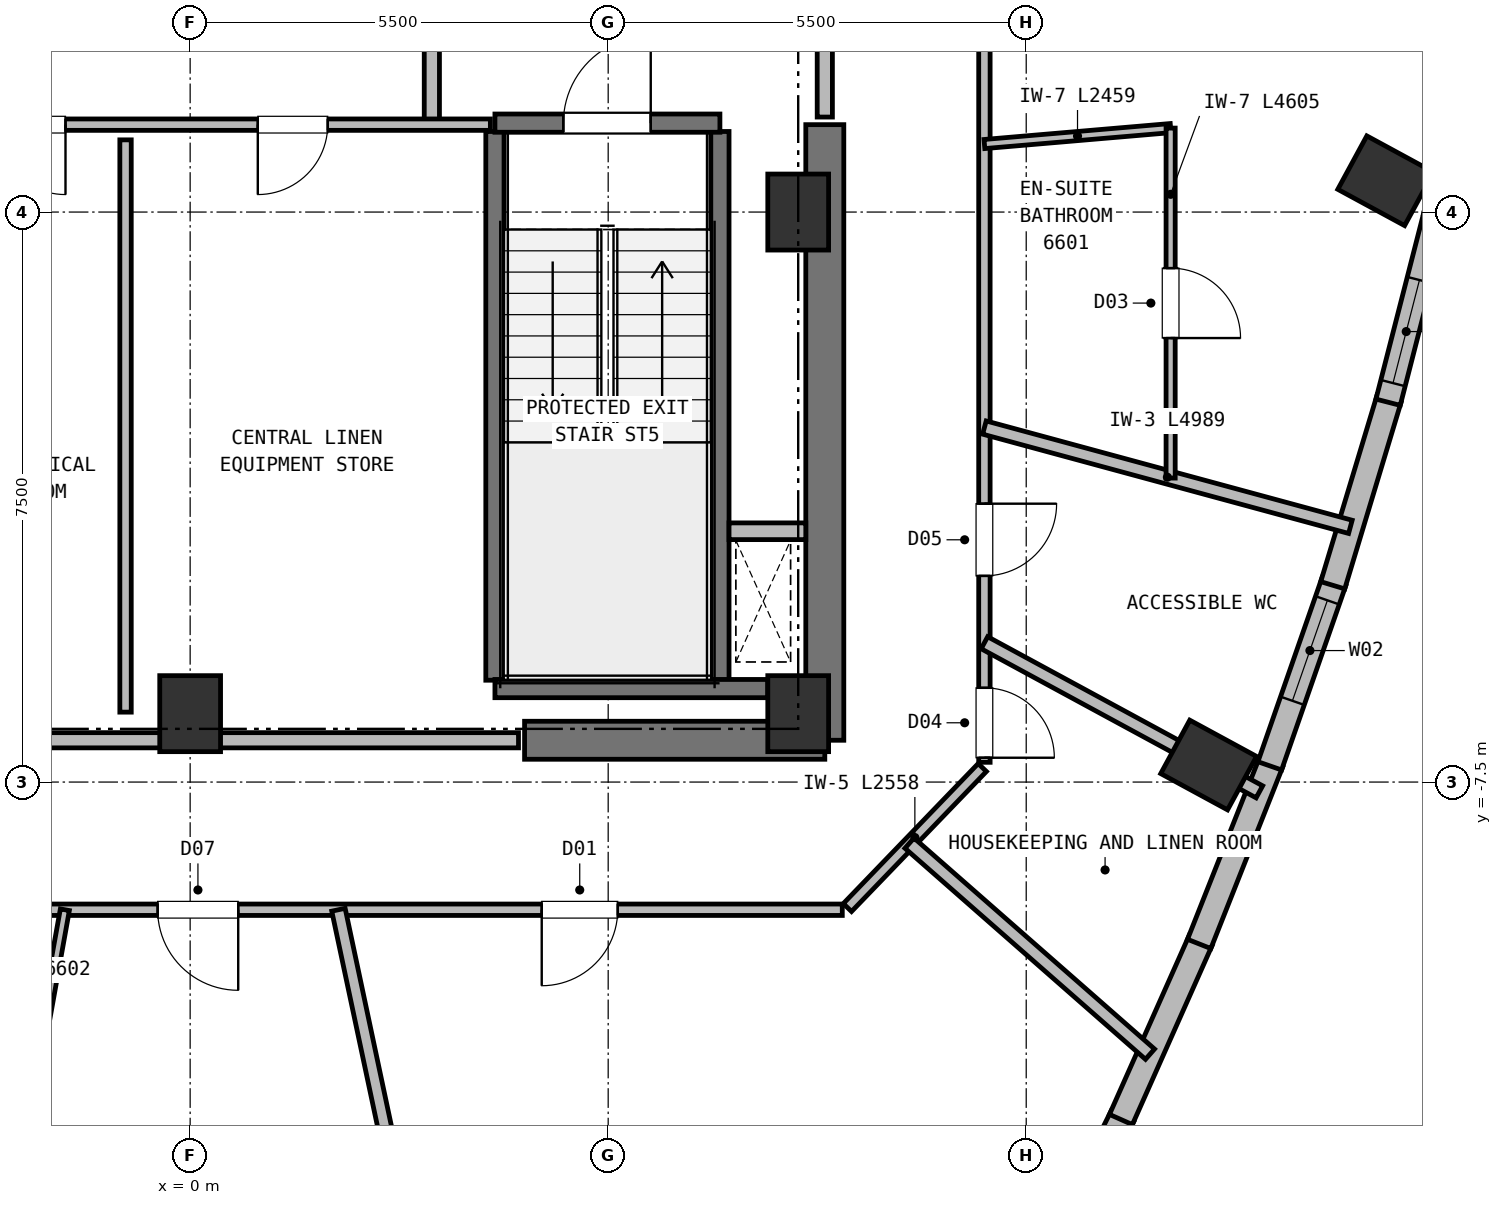
"""IFC4 building model, lengths in metres.
Left out: names, types, materials, properties, quantities, classifications, styles, units other than length and angle.
Written with IfcOpenShell. Run it as: python <this file> out.ifc"""

import sys

from ifc_helpers import new_model, si_unit, direction, frame, frame_2d, origin, origin_2d, place, context, subcontext, project, spatial, rectangle, extrude, element, fill, save


model = new_model("IFC4")
c1 = context("Model", 3, precision=1e-05, world=origin(), true_north=direction((0.0, 1.0)))
c2 = subcontext(c1, "Body", "Model", "MODEL_VIEW")
j1 = project(units=[si_unit("LENGTHUNIT", "METRE"), si_unit("PLANEANGLEUNIT", "RADIAN")], contexts=[c1])
p1 = place(None, origin())
s1 = spatial("IfcSite", under=j1, at=p1, CompositionType="ELEMENT")
p2 = place(p1, origin())
s2 = spatial("IfcBuilding", under=s1, at=p2, CompositionType="ELEMENT")
p3 = place(p2, frame((0.0, 0.0, 251.15)))
s3 = spatial("IfcBuildingStorey", under=s2, at=p3, CompositionType="ELEMENT", Elevation=251.15)
for number, where, z_axis, x_axis in (
    (1, (0.0, -6.6, 0.0), (0.0, 0.0, 1.0), (1.0, 0.0, 0.0)),
    (2, (8.0, -6.6, 0.0), (0.0, 0.0, 1.0), (1.0, 0.0, 0.0)),
    (3, (8.0, 0.0, 0.0), (0.0, 0.0, 1.0), (1.0, 0.0, 0.0)),
):
    element("IfcColumn", number, at=place(p3, frame(where, z_axis=z_axis, x_axis=x_axis)), inside=s3, PredefinedType="COLUMN", context=c2, shape_type="SweptSolid", body=[
        extrude(rectangle(XDim=0.8, YDim=1.0, at=origin_2d()), origin(), (0.0, 0.0, 1.0), 3.8),
    ])
p4 = place(p3, frame((4.4, -6.95, 0.0), z_axis=(0.0, 0.0, 1.0), x_axis=(1.0, 0.0, 0.0)))
e4 = element("IfcWall", 4, at=p4, inside=s3, PredefinedType="SHEAR", context=c2, shape_type="SweptSolid", body=[
    extrude(rectangle(XDim=3.95, YDim=0.5, at=frame_2d((1.975, 0.0))), origin(), (0.0, 0.0, 1.0), 3.49),
])
p5 = place(p3, frame((8.35, -6.95, 0.0), z_axis=(0.0, 0.0, 1.0), x_axis=(0.0, 1.0, 0.0)))
e5 = element("IfcWall", 5, at=p5, inside=s3, PredefinedType="SHEAR", context=c2, shape_type="SweptSolid", body=[
    extrude(rectangle(XDim=8.1, YDim=0.5, at=frame_2d((4.05, 0.0))), origin(), (0.0, 0.0, 1.0), 3.49),
])
for number, where, z_axis, x_axis in (
    (6, (13.4, -7.276, 0.0), (0.0, 0.0, 1.0), (0.477, 0.879, 0.0)),
    (7, (15.73, 0.412, 0.0), (0.0, 0.0, 1.0), (0.477, 0.879, 0.0)),
):
    element("IfcColumn", number, at=place(p3, frame(where, z_axis=z_axis, x_axis=x_axis)), inside=s3, PredefinedType="COLUMN", context=c2, shape_type="SweptSolid", body=[
        extrude(rectangle(XDim=0.8, YDim=1.0, at=origin_2d()), origin(), (0.0, 0.0, 1.0), 3.8),
    ])
p6 = place(p3, frame((12.267, -11.895, 0.0), z_axis=(0.0, 0.0, 1.0), x_axis=(-0.44393335953, -0.896059803973, 0.0)))
e8 = element("IfcWall", 8, at=p6, inside=s3, PredefinedType="SOLIDWALL", context=c2, shape_type="SweptSolid", body=[
    extrude(rectangle(XDim=2.593, YDim=0.33, at=frame_2d((1.296, 0.0))), origin(), (0.0, 0.0, 1.0), 3.49),
])
p7 = place(p6, frame((0.596, 0.0, 0.72)))
e9 = element("IfcOpeningElement", 9, at=p7, cuts=e8, PredefinedType="OPENING", context=c2, shape_type="SweptSolid", body=[
    extrude(rectangle(XDim=1.4, YDim=1.84, at=frame_2d((0.7, 0.92))), frame((0.0, 0.175, 0.0), z_axis=(0.0, -1.0, 0.0), x_axis=(1.0, 0.0, 0.0)), (0.0, 0.0, 1.0), 0.35),
])
p8 = place(p3, frame((13.295, -9.584, 0.0), z_axis=(0.0, 0.0, 1.0), x_axis=(-0.406630213632, -0.913592835656, 0.0)))
e10 = element("IfcWall", 10, at=p8, inside=s3, PredefinedType="SOLIDWALL", context=c2, shape_type="SweptSolid", body=[
    extrude(rectangle(XDim=2.579, YDim=0.33, at=frame_2d((1.29, 0.0))), origin(), (0.0, 0.0, 1.0), 3.49),
])
p9 = place(p3, frame((14.222, -7.24, 0.0), z_axis=(0.0, 0.0, 1.0), x_axis=(-0.368145960329, -0.929768009717, 0.0)))
e11 = element("IfcWall", 11, at=p9, inside=s3, PredefinedType="SOLIDWALL", context=c2, shape_type="SweptSolid", body=[
    extrude(rectangle(XDim=2.57, YDim=0.33, at=frame_2d((1.285, 0.0))), origin(), (0.0, 0.0, 1.0), 3.49),
])
p10 = place(p3, frame((15.048, -4.863, 0.0), z_axis=(0.0, 0.0, 1.0), x_axis=(-0.328900678989, -0.944364518266, 0.0)))
e12 = element("IfcWall", 12, at=p10, inside=s3, PredefinedType="SOLIDWALL", context=c2, shape_type="SweptSolid", body=[
    extrude(rectangle(XDim=2.566, YDim=0.33, at=frame_2d((1.283, 0.0))), origin(), (0.0, 0.0, 1.0), 3.49),
])
p11 = place(p10, frame((0.26, 0.0, 0.72)))
e13 = element("IfcOpeningElement", 13, at=p11, cuts=e12, PredefinedType="OPENING", context=c2, shape_type="SweptSolid", body=[
    extrude(rectangle(XDim=1.4, YDim=1.84, at=frame_2d((0.7, 0.92))), frame((0.0, 0.175, 0.0), z_axis=(0.0, -1.0, 0.0), x_axis=(1.0, 0.0, 0.0)), (0.0, 0.0, 1.0), 0.35),
])
p12 = place(p3, frame((15.774, -2.454, 0.0), z_axis=(0.0, 0.0, 1.0), x_axis=(-0.288953589152, -0.957343106371, 0.0)))
e14 = element("IfcWall", 14, at=p12, inside=s3, PredefinedType="SOLIDWALL", context=c2, shape_type="SweptSolid", body=[
    extrude(rectangle(XDim=2.566, YDim=0.33, at=frame_2d((1.283, 0.0))), origin(), (0.0, 0.0, 1.0), 3.49),
])
p13 = place(p3, frame((16.4, -0.012, 0.0), z_axis=(0.0, 0.0, 1.0), x_axis=(-0.248743226802, -0.968569464272, 0.0)))
e15 = element("IfcWall", 15, at=p13, inside=s3, PredefinedType="SOLIDWALL", context=c2, shape_type="SweptSolid", body=[
    extrude(rectangle(XDim=2.571, YDim=0.33, at=frame_2d((1.285, 0.0))), origin(), (0.0, 0.0, 1.0), 3.49),
])
p14 = place(p13, frame((0.911, 0.0, 0.72)))
e16 = element("IfcOpeningElement", 16, at=p14, cuts=e15, PredefinedType="OPENING", context=c2, shape_type="SweptSolid", body=[
    extrude(rectangle(XDim=1.4, YDim=1.84, at=frame_2d((0.7, 0.92))), frame((0.0, 0.175, 0.0), z_axis=(0.0, -1.0, 0.0), x_axis=(1.0, 0.0, 0.0)), (0.0, 0.0, 1.0), 0.35),
])
for number, where, z_axis, x_axis in (
    (17, (4.01, -6.16, 0.0), (0.0, 0.0, 1.0), (0.0, 1.0, 0.0)),
    (18, (6.97, -6.16, 0.0), (0.0, 0.0, 1.0), (0.0, 1.0, 0.0)),
):
    element("IfcWall", number, at=place(p3, frame(where, z_axis=z_axis, x_axis=x_axis)), inside=s3, PredefinedType="SHEAR", context=c2, shape_type="SweptSolid", body=[
        extrude(rectangle(XDim=7.22, YDim=0.24, at=frame_2d((3.61, 0.0))), origin(), (0.0, 0.0, 1.0), 3.49),
    ])
p15 = place(p3, frame((4.01, -6.27, 0.0), z_axis=(0.0, 0.0, 1.0), x_axis=(1.0, 0.0, 0.0)))
e19 = element("IfcWall", 19, at=p15, inside=s3, PredefinedType="SHEAR", context=c2, shape_type="SweptSolid", body=[
    extrude(rectangle(XDim=3.59, YDim=0.24, at=frame_2d((1.795, 0.0))), origin(), (0.0, 0.0, 1.0), 3.49),
])
p16 = place(p3, frame((4.01, 1.17, 0.0), z_axis=(0.0, 0.0, 1.0), x_axis=(1.0, 0.0, 0.0)))
e20 = element("IfcWall", 20, at=p16, inside=s3, PredefinedType="SHEAR", context=c2, shape_type="SweptSolid", body=[
    extrude(rectangle(XDim=2.96, YDim=0.24, at=frame_2d((1.48, 0.0))), origin(), (0.0, 0.0, 1.0), 3.49),
])
p17 = place(p16, frame((0.9, 0.0, 0.0)))
e21 = element("IfcOpeningElement", 21, at=p17, cuts=e20, PredefinedType="OPENING", context=c2, shape_type="SweptSolid", body=[
    extrude(rectangle(XDim=1.15, YDim=2.15, at=frame_2d((0.575, 1.075))), frame((0.0, 0.13, 0.0), z_axis=(0.0, -1.0, 0.0), x_axis=(1.0, 0.0, 0.0)), (0.0, 0.0, 1.0), 0.26),
])
p18 = place(p3, frame((7.09, -4.2, 0.0), z_axis=(0.0, 0.0, 1.0), x_axis=(1.0, 0.0, 0.0)))
e22 = element("IfcWall", 22, at=p18, inside=s3, PredefinedType="PARTITIONING", context=c2, shape_type="SweptSolid", body=[
    extrude(rectangle(XDim=1.01, YDim=0.22, at=frame_2d((0.505, 0.0))), origin(), (0.0, 0.0, 1.0), 3.49),
])
p19 = place(p3, frame((3.18, 1.15, 0.0), z_axis=(0.0, 0.0, 1.0), x_axis=(0.0, 1.0, 0.0)))
e23 = element("IfcWall", 23, at=p19, inside=s3, PredefinedType="PARTITIONING", context=c2, shape_type="SweptSolid", body=[
    extrude(rectangle(XDim=3.3, YDim=0.2, at=frame_2d((1.65, 0.0))), origin(), (0.0, 0.0, 1.0), 3.49),
])
p20 = place(p19, frame((1.08, 0.0, 0.0)))
e24 = element("IfcOpeningElement", 24, at=p20, cuts=e23, PredefinedType="OPENING", context=c2, shape_type="SweptSolid", body=[
    extrude(rectangle(XDim=1.15, YDim=2.15, at=frame_2d((0.575, 1.075))), frame((0.0, 0.11, 0.0), z_axis=(0.0, -1.0, 0.0), x_axis=(1.0, 0.0, 0.0)), (0.0, 0.0, 1.0), 0.22),
])
p21 = place(p3, frame((8.35, 1.25, 0.0), z_axis=(0.0, 0.0, 1.0), x_axis=(0.0, 1.0, 0.0)))
e25 = element("IfcWall", 25, at=p21, inside=s3, PredefinedType="PARTITIONING", context=c2, shape_type="SweptSolid", body=[
    extrude(rectangle(XDim=5.3, YDim=0.2, at=frame_2d((2.65, 0.0))), origin(), (0.0, 0.0, 1.0), 3.49),
])
p22 = place(p21, frame((0.95, 0.0, 0.0)))
e26 = element("IfcOpeningElement", 26, at=p22, cuts=e25, PredefinedType="OPENING", context=c2, shape_type="SweptSolid", body=[
    extrude(rectangle(XDim=1.15, YDim=2.15, at=frame_2d((0.575, 1.075))), frame((0.0, 0.11, 0.0), z_axis=(0.0, -1.0, 0.0), x_axis=(1.0, 0.0, 0.0)), (0.0, 0.0, 1.0), 0.22),
])
p23 = place(p3, frame((3.95, 1.15, 0.0), z_axis=(0.0, 0.0, 1.0), x_axis=(-1.0, 0.0, 0.0)))
e27 = element("IfcWall", 27, at=p23, inside=s3, PredefinedType="PARTITIONING", context=c2, shape_type="SweptSolid", body=[
    extrude(rectangle(XDim=7.9, YDim=0.15, at=frame_2d((3.95, 0.0))), origin(), (0.0, 0.0, 1.0), 3.49),
])
p24 = place(p23, frame((5.59, 0.0, 0.0)))
e28 = element("IfcOpeningElement", 28, at=p24, cuts=e27, PredefinedType="OPENING", context=c2, shape_type="SweptSolid", body=[
    extrude(rectangle(XDim=0.92, YDim=2.05, at=frame_2d((0.46, 1.025))), frame((0.0, 0.085, 0.0), z_axis=(0.0, -1.0, 0.0), x_axis=(1.0, 0.0, 0.0)), (0.0, 0.0, 1.0), 0.17),
])
p25 = place(p23, frame((2.14, 0.0, 0.0)))
e29 = element("IfcOpeningElement", 29, at=p25, cuts=e27, PredefinedType="OPENING", context=c2, shape_type="SweptSolid", body=[
    extrude(rectangle(XDim=0.92, YDim=2.05, at=frame_2d((0.46, 1.025))), frame((0.0, 0.085, 0.0), z_axis=(0.0, -1.0, 0.0), x_axis=(1.0, 0.0, 0.0)), (0.0, 0.0, 1.0), 0.17),
])
p26 = place(p3, frame((-4.32, -6.95, 0.0), z_axis=(0.0, 0.0, 1.0), x_axis=(1.0, 0.0, 0.0)))
e30 = element("IfcWall", 30, at=p26, inside=s3, PredefinedType="PARTITIONING", context=c2, shape_type="SweptSolid", body=[
    extrude(rectangle(XDim=8.64, YDim=0.2, at=frame_2d((4.32, 0.0))), origin(), (0.0, 0.0, 1.0), 3.49),
])
p27 = place(p3, frame((-0.85, -6.58, 0.0), z_axis=(0.0, 0.0, 1.0), x_axis=(0.0, 1.0, 0.0)))
e31 = element("IfcWall", 31, at=p27, inside=s3, PredefinedType="PARTITIONING", context=c2, shape_type="SweptSolid", body=[
    extrude(rectangle(XDim=7.53, YDim=0.15, at=frame_2d((3.765, 0.0))), origin(), (0.0, 0.0, 1.0), 3.49),
])
p28 = place(p3, frame((8.58, -9.18, 0.0), z_axis=(0.0, 0.0, 1.0), x_axis=(-1.0, 0.0, 0.0)))
e32 = element("IfcWall", 32, at=p28, inside=s3, PredefinedType="PARTITIONING", context=c2, shape_type="SweptSolid", body=[
    extrude(rectangle(XDim=17.16, YDim=0.15, at=frame_2d((8.58, 0.0))), origin(), (0.0, 0.0, 1.0), 3.17),
])
p29 = place(p28, frame((14.872, 0.0, 0.0)))
e33 = element("IfcOpeningElement", 33, at=p29, cuts=e32, PredefinedType="OPENING", context=c2, shape_type="SweptSolid", body=[
    extrude(rectangle(XDim=1.0, YDim=2.15, at=frame_2d((0.5, 1.075))), frame((0.0, 0.085, 0.0), z_axis=(0.0, -1.0, 0.0), x_axis=(1.0, 0.0, 0.0)), (0.0, 0.0, 1.0), 0.17),
])
p30 = place(p28, frame((2.954, 0.0, 0.0)))
e34 = element("IfcOpeningElement", 34, at=p30, cuts=e32, PredefinedType="OPENING", context=c2, shape_type="SweptSolid", body=[
    extrude(rectangle(XDim=1.0, YDim=2.15, at=frame_2d((0.5, 1.075))), frame((0.0, 0.085, 0.0), z_axis=(0.0, -1.0, 0.0), x_axis=(1.0, 0.0, 0.0)), (0.0, 0.0, 1.0), 0.17),
])
p31 = place(p28, frame((7.948, 0.0, 0.0)))
e35 = element("IfcOpeningElement", 35, at=p31, cuts=e32, PredefinedType="OPENING", context=c2, shape_type="SweptSolid", body=[
    extrude(rectangle(XDim=1.06, YDim=2.15, at=frame_2d((0.53, 1.075))), frame((0.0, 0.085, 0.0), z_axis=(0.0, -1.0, 0.0), x_axis=(1.0, 0.0, 0.0)), (0.0, 0.0, 1.0), 0.17),
])
p32 = place(p3, frame((10.422, -7.309, 0.0), z_axis=(0.0, 0.0, 1.0), x_axis=(-0.693764562202, -0.720201869085, 0.0)))
e36 = element("IfcWall", 36, at=p32, inside=s3, PredefinedType="PARTITIONING", context=c2, shape_type="SweptSolid", body=[
    extrude(rectangle(XDim=2.558, YDim=0.15, at=frame_2d((1.279, 0.0))), origin(), (0.0, 0.0, 1.0), 3.17),
])
p33 = place(p3, frame((10.45, 7.24, 0.0), z_axis=(0.0, 0.0, 1.0), x_axis=(0.0, -1.0, 0.0)))
e37 = element("IfcWall", 37, at=p33, inside=s3, PredefinedType="PARTITIONING", context=c2, shape_type="SweptSolid", body=[
    extrude(rectangle(XDim=14.48, YDim=0.15, at=frame_2d((7.24, 0.0))), origin(), (0.0, 0.0, 1.0), 3.49),
])
p34 = place(p33, frame((13.5, 0.0, 0.0)))
e38 = element("IfcOpeningElement", 38, at=p34, cuts=e37, PredefinedType="OPENING", context=c2, shape_type="SweptSolid", body=[
    extrude(rectangle(XDim=0.92, YDim=2.05, at=frame_2d((0.46, 1.025))), frame((0.0, 0.085, 0.0), z_axis=(0.0, -1.0, 0.0), x_axis=(1.0, 0.0, 0.0)), (0.0, 0.0, 1.0), 0.17),
])
p35 = place(p33, frame((11.077, 0.0, 0.0)))
e39 = element("IfcOpeningElement", 39, at=p35, cuts=e37, PredefinedType="OPENING", context=c2, shape_type="SweptSolid", body=[
    extrude(rectangle(XDim=0.95, YDim=2.1, at=frame_2d((0.475, 1.05))), frame((0.0, 0.085, 0.0), z_axis=(0.0, -1.0, 0.0), x_axis=(1.0, 0.0, 0.0)), (0.0, 0.0, 1.0), 0.17),
])
p36 = place(p33, frame((3.469, 0.0, 0.0)))
e40 = element("IfcOpeningElement", 40, at=p36, cuts=e37, PredefinedType="OPENING", context=c2, shape_type="SweptSolid", body=[
    extrude(rectangle(XDim=1.06, YDim=2.15, at=frame_2d((0.53, 1.075))), frame((0.0, 0.085, 0.0), z_axis=(0.0, -1.0, 0.0), x_axis=(1.0, 0.0, 0.0)), (0.0, 0.0, 1.0), 0.17),
])
p37 = place(p3, frame((10.45, -2.835, 0.0), z_axis=(0.0, 0.0, 1.0), x_axis=(0.965095058009, -0.261899845374, 0.0)))
e41 = element("IfcWall", 41, at=p37, inside=s3, PredefinedType="PARTITIONING", context=c2, shape_type="SweptSolid", body=[
    extrude(rectangle(XDim=4.989, YDim=0.18, at=frame_2d((2.495, 0.0))), origin(), (0.0, 0.0, 1.0), 3.49),
])
p38 = place(p3, frame((10.45, 0.895, 0.0), z_axis=(0.0, 0.0, 1.0), x_axis=(0.996356297921, 0.085288496255, 0.0)))
e42 = element("IfcWall", 42, at=p38, inside=s3, PredefinedType="PARTITIONING", context=c2, shape_type="SweptSolid", body=[
    extrude(rectangle(XDim=2.459, YDim=0.12, at=frame_2d((1.229, 0.0))), origin(), (0.0, 0.0, 1.0), 3.49),
])
p39 = place(p3, frame((12.9, 1.105, 0.0), z_axis=(0.0, 0.0, 1.0), x_axis=(0.0, -1.0, 0.0)))
e43 = element("IfcWall", 43, at=p39, inside=s3, PredefinedType="PARTITIONING", context=c2, shape_type="SweptSolid", body=[
    extrude(rectangle(XDim=4.605, YDim=0.12, at=frame_2d((2.302, 0.0))), origin(), (0.0, 0.0, 1.0), 3.17),
])
p40 = place(p39, frame((1.843, 0.0, 0.0)))
e44 = element("IfcOpeningElement", 44, at=p40, cuts=e43, PredefinedType="OPENING", context=c2, shape_type="SweptSolid", body=[
    extrude(rectangle(XDim=0.92, YDim=2.1, at=frame_2d((0.46, 1.05))), frame((0.0, 0.07, 0.0), z_axis=(0.0, -1.0, 0.0), x_axis=(1.0, 0.0, 0.0)), (0.0, 0.0, 1.0), 0.14),
])
p41 = place(p3, frame((-1.648, -9.18, 0.0), z_axis=(0.0, 0.0, 1.0), x_axis=(-0.176744464774, -0.984256772479, 0.0)))
e45 = element("IfcWall", 45, at=p41, inside=s3, PredefinedType="PARTITIONING", context=c2, shape_type="SweptSolid", body=[
    extrude(rectangle(XDim=2.489, YDim=0.12, at=frame_2d((1.245, 0.0))), origin(), (0.0, 0.0, 1.0), 3.49),
])
p42 = place(p3, frame((1.951, -9.18, 0.0), z_axis=(0.0, 0.0, 1.0), x_axis=(0.20789337158, -0.978151494429, 0.0)))
e46 = element("IfcWall", 46, at=p42, inside=s3, PredefinedType="PARTITIONING", context=c2, shape_type="SweptSolid", body=[
    extrude(rectangle(XDim=13.243, YDim=0.18, at=frame_2d((6.622, 0.0))), origin(), (0.0, 0.0, 1.0), 3.49),
])
p43 = place(p3, frame((9.464, -8.304, 0.0), z_axis=(0.0, 0.0, 1.0), x_axis=(0.751703129052, -0.659501634398, 0.0)))
e47 = element("IfcWall", 47, at=p43, inside=s3, PredefinedType="PARTITIONING", context=c2, shape_type="SweptSolid", body=[
    extrude(rectangle(XDim=4.21, YDim=0.18, at=frame_2d((2.105, 0.0))), origin(), (0.0, 0.0, 1.0), 3.49),
])
p44 = place(p3, frame((10.45, -5.667, 0.0), z_axis=(0.0, 0.0, 1.0), x_axis=(0.879067247928, -0.476697780171, 0.0)))
e48 = element("IfcWall", 48, at=p44, inside=s3, PredefinedType="PARTITIONING", context=c2, shape_type="SweptSolid", body=[
    extrude(rectangle(XDim=4.116, YDim=0.18, at=frame_2d((2.058, 0.0))), origin(), (0.0, 0.0, 1.0), 3.49),
])
p45 = place(p11, origin())
e49 = element("IfcWindow", 49, at=p45, inside=s3, PartitioningType="SINGLE_PANEL", PredefinedType="WINDOW", context=c2, shape_type="SweptSolid", body=[
    extrude(rectangle(XDim=1.4, YDim=1.84, at=frame_2d((0.7, 0.92))), frame((0.0, 0.03, 0.0), z_axis=(0.0, -1.0, 0.0), x_axis=(1.0, 0.0, 0.0)), (0.0, 0.0, 1.0), 0.06),
])
fill(e13, e49)
p46 = place(p14, origin())
e50 = element("IfcWindow", 50, at=p46, inside=s3, PartitioningType="SINGLE_PANEL", PredefinedType="WINDOW", context=c2, shape_type="SweptSolid", body=[
    extrude(rectangle(XDim=1.4, YDim=1.84, at=frame_2d((0.7, 0.92))), frame((0.0, 0.03, 0.0), z_axis=(0.0, -1.0, 0.0), x_axis=(1.0, 0.0, 0.0)), (0.0, 0.0, 1.0), 0.06),
])
fill(e16, e50)
p47 = place(p17, origin())
e51 = element("IfcDoor", 51, at=p47, inside=s3, OperationType="SINGLE_SWING_RIGHT", PredefinedType="DOOR", context=c2, shape_type="SweptSolid", body=[
    extrude(rectangle(XDim=1.15, YDim=2.15, at=frame_2d((0.575, 1.075))), frame((0.0, 0.025, 0.0), z_axis=(0.0, -1.0, 0.0), x_axis=(1.0, 0.0, 0.0)), (0.0, 0.0, 1.0), 0.05),
])
fill(e21, e51)
p48 = place(p24, origin())
e52 = element("IfcDoor", 52, at=p48, inside=s3, OperationType="SINGLE_SWING_LEFT", PredefinedType="DOOR", context=c2, shape_type="SweptSolid", body=[
    extrude(rectangle(XDim=0.92, YDim=2.05, at=frame_2d((0.46, 1.025))), frame((0.0, 0.025, 0.0), z_axis=(0.0, -1.0, 0.0), x_axis=(1.0, 0.0, 0.0)), (0.0, 0.0, 1.0), 0.05),
])
fill(e28, e52)
p49 = place(p25, origin())
e53 = element("IfcDoor", 53, at=p49, inside=s3, OperationType="SINGLE_SWING_RIGHT", PredefinedType="DOOR", context=c2, shape_type="SweptSolid", body=[
    extrude(rectangle(XDim=0.92, YDim=2.05, at=frame_2d((0.46, 1.025))), frame((0.0, 0.025, 0.0), z_axis=(0.0, -1.0, 0.0), x_axis=(1.0, 0.0, 0.0)), (0.0, 0.0, 1.0), 0.05),
])
fill(e29, e53)
p50 = place(p40, origin())
e54 = element("IfcDoor", 54, at=p50, inside=s3, OperationType="SINGLE_SWING_RIGHT", PredefinedType="DOOR", context=c2, shape_type="SweptSolid", body=[
    extrude(rectangle(XDim=0.92, YDim=2.1, at=frame_2d((0.46, 1.05))), frame((0.0, 0.025, 0.0), z_axis=(0.0, -1.0, 0.0), x_axis=(1.0, 0.0, 0.0)), (0.0, 0.0, 1.0), 0.05),
])
fill(e44, e54)
p51 = place(p34, origin())
e55 = element("IfcDoor", 55, at=p51, inside=s3, OperationType="SINGLE_SWING_RIGHT", PredefinedType="DOOR", context=c2, shape_type="SweptSolid", body=[
    extrude(rectangle(XDim=0.92, YDim=2.05, at=frame_2d((0.46, 1.025))), frame((0.0, 0.025, 0.0), z_axis=(0.0, -1.0, 0.0), x_axis=(1.0, 0.0, 0.0)), (0.0, 0.0, 1.0), 0.05),
])
fill(e38, e55)
p52 = place(p35, origin())
e56 = element("IfcDoor", 56, at=p52, inside=s3, OperationType="SINGLE_SWING_LEFT", PredefinedType="DOOR", context=c2, shape_type="SweptSolid", body=[
    extrude(rectangle(XDim=0.95, YDim=2.1, at=frame_2d((0.475, 1.05))), frame((0.0, 0.025, 0.0), z_axis=(0.0, -1.0, 0.0), x_axis=(1.0, 0.0, 0.0)), (0.0, 0.0, 1.0), 0.05),
])
fill(e39, e56)
p53 = place(p30, origin())
e57 = element("IfcDoor", 57, at=p53, inside=s3, OperationType="SINGLE_SWING_RIGHT", PredefinedType="DOOR", context=c2, shape_type="SweptSolid", body=[
    extrude(rectangle(XDim=1.0, YDim=2.15, at=frame_2d((0.5, 1.075))), frame((0.0, 0.025, 0.0), z_axis=(0.0, -1.0, 0.0), x_axis=(1.0, 0.0, 0.0)), (0.0, 0.0, 1.0), 0.05),
])
fill(e34, e57)
p54 = place(p31, origin())
e58 = element("IfcDoor", 58, at=p54, inside=s3, OperationType="SINGLE_SWING_LEFT", PredefinedType="DOOR", context=c2, shape_type="SweptSolid", body=[
    extrude(rectangle(XDim=1.06, YDim=2.15, at=frame_2d((0.53, 1.075))), frame((0.0, 0.025, 0.0), z_axis=(0.0, -1.0, 0.0), x_axis=(1.0, 0.0, 0.0)), (0.0, 0.0, 1.0), 0.05),
])
fill(e35, e58)
save(model, sys.argv[1])
